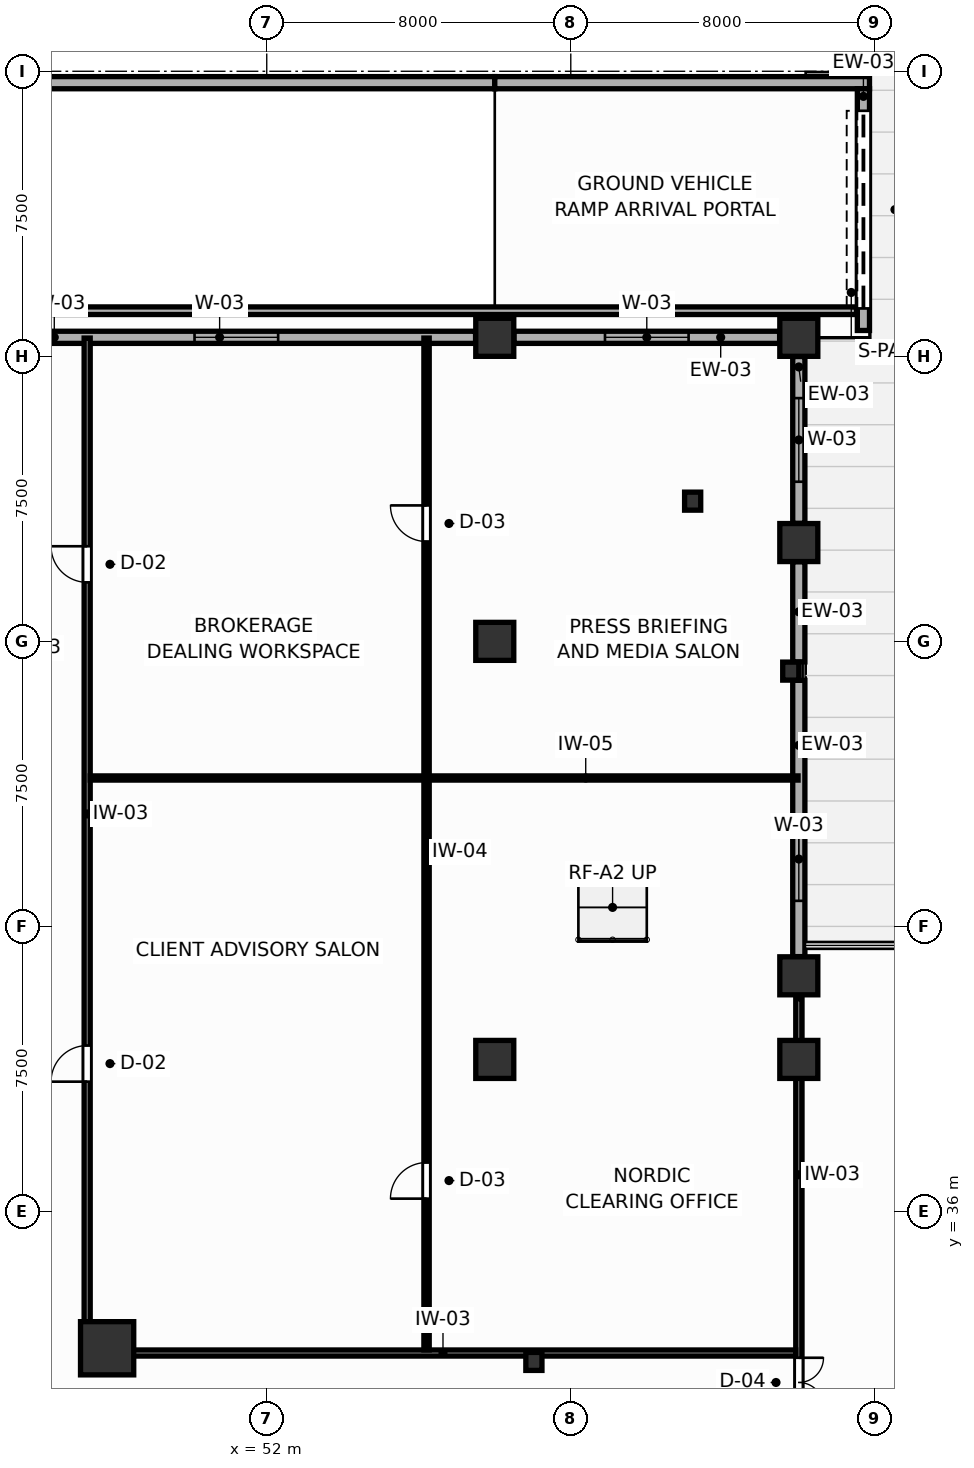
"""IFC4 building model, lengths in metres.
Left out: names, types, materials, properties, quantities, classifications, styles, units other than length and angle.
Written with IfcOpenShell. Run it as: python <this file> out.ifc"""

import sys

from ifc_helpers import new_model, si_unit, direction, frame, frame_2d, origin, origin_2d, place, context, subcontext, project, spatial, rectangle, i_section, extrude, source, transform, mapped, element, fill, save


model = new_model("IFC4")
c1 = context("Model", 3, precision=1e-05, world=origin(), true_north=direction((0.0, 1.0)))
c2 = subcontext(c1, "Body", "Model", "MODEL_VIEW")
j1 = project(units=[si_unit("LENGTHUNIT", "METRE"), si_unit("PLANEANGLEUNIT", "RADIAN")], contexts=[c1])
p1 = place(None, origin())
s1 = spatial("IfcSite", under=j1, at=p1, CompositionType="ELEMENT")
p2 = place(p1, origin())
s2 = spatial("IfcBuilding", under=s1, at=p2, CompositionType="ELEMENT")
p3 = place(p2, origin())
s3 = spatial("IfcBuildingStorey", under=s2, at=p3, CompositionType="ELEMENT", Elevation=0.0)
m1 = source(origin(), c2, "Body", "SweptSolid", [
    extrude(rectangle(XDim=1.4, YDim=1.4, at=origin_2d()), origin(), (0.0, 0.0, 1.0), 4.8),
])
p4 = place(p3, frame((47.8, 32.4, 0.0), z_axis=(0.0, 0.0, 1.0), x_axis=(1.0, 0.0, 0.0)))
e1 = element("IfcColumn", 1, at=p4, inside=s3, PredefinedType="COLUMN", context=c2, shape_type="MappedRepresentation", body=[
    mapped(m1, transform((0.0, 0.0, 0.0), scale=1.0)),
])
m2 = source(origin(), c2, "Body", "SweptSolid", [
    extrude(rectangle(XDim=1.0, YDim=1.0, at=origin_2d()), origin(), (0.0, 0.0, 1.0), 4.8),
])
for number, where, z_axis, x_axis in (
    (2, (66.0, 40.0, 0.0), (0.0, 0.0, 1.0), (1.0, 0.0, 0.0)),
    (3, (66.0, 53.6, 0.0), (0.0, 0.0, 1.0), (1.0, 0.0, 0.0)),
    (4, (66.0, 59.0, 0.0), (0.0, 0.0, 1.0), (1.0, 0.0, 0.0)),
    (5, (58.0, 59.0, 0.0), (0.0, 0.0, 1.0), (1.0, 0.0, 0.0)),
    (6, (58.0, 40.0, 0.0), (0.0, 0.0, 1.0), (1.0, 0.0, 0.0)),
    (7, (58.0, 51.0, 0.0), (0.0, 0.0, 1.0), (1.0, 0.0, 0.0)),
    (8, (66.0, 42.2, 0.0), (0.0, 0.0, 1.0), (1.0, 0.0, 0.0)),
):
    element("IfcColumn", number, at=place(p3, frame(where, z_axis=z_axis, x_axis=x_axis)), inside=s3, PredefinedType="COLUMN", context=c2, shape_type="MappedRepresentation", body=[
        mapped(m2, transform((0.0, 0.0, 0.0), scale=1.0)),
    ])
m3 = source(origin(), c2, "Body", "SweptSolid", [
    extrude(i_section(OverallWidth=0.424, OverallDepth=0.474, WebThickness=0.045, FlangeThickness=0.072, FilletRadius=0.015, at=origin_2d()), origin(), (0.0, 0.0, 1.0), 4.8),
])
for number, where, z_axis, x_axis in (
    (9, (65.789, 50.217, 0.0), (0.0, 0.0, 1.0), (1.0, 0.0, 0.0)),
    (10, (63.207, 54.689, 0.0), (0.0, 0.0, 1.0), (1.0, 0.0, 0.0)),
    (11, (59.03, 32.054, 0.0), (0.0, 0.0, 1.0), (1.0, 0.0, 0.0)),
):
    element("IfcColumn", number, at=place(p3, frame(where, z_axis=z_axis, x_axis=x_axis)), inside=s3, PredefinedType="COLUMN", context=c2, shape_type="MappedRepresentation", body=[
        mapped(m3, transform((0.0, 0.0, 0.0), scale=1.0)),
    ])
p5 = place(p3, frame((44.905, 59.0, 0.0), z_axis=(0.0, 0.0, 1.0), x_axis=(1.0, 0.0, 0.0)))
e12 = element("IfcWall", 12, at=p5, inside=s3, PredefinedType="SOLIDWALL", context=c2, shape_type="SweptSolid", body=[
    extrude(rectangle(XDim=12.59, YDim=0.32, at=frame_2d((6.295, 0.0))), origin(), (0.0, 0.0, 1.0), 3.82),
])
p6 = place(p5, frame((5.195, 0.0, 0.75)))
e13 = element("IfcOpeningElement", 13, at=p6, cuts=e12, PredefinedType="OPENING", context=c2, shape_type="SweptSolid", body=[
    extrude(rectangle(XDim=2.2, YDim=2.0, at=frame_2d((1.1, 1.0))), frame((0.0, 0.17, 0.0), z_axis=(0.0, -1.0, 0.0), x_axis=(1.0, 0.0, 0.0)), (0.0, 0.0, 1.0), 0.34),
])
p7 = place(p3, frame((58.505, 59.0, 0.0), z_axis=(0.0, 0.0, 1.0), x_axis=(1.0, 0.0, 0.0)))
e14 = element("IfcWall", 14, at=p7, inside=s3, PredefinedType="SOLIDWALL", context=c2, shape_type="SweptSolid", body=[
    extrude(rectangle(XDim=6.99, YDim=0.32, at=frame_2d((3.495, 0.0))), origin(), (0.0, 0.0, 1.0), 3.82),
])
p8 = place(p7, frame((2.395, 0.0, 0.75)))
e15 = element("IfcOpeningElement", 15, at=p8, cuts=e14, PredefinedType="OPENING", context=c2, shape_type="SweptSolid", body=[
    extrude(rectangle(XDim=2.2, YDim=2.0, at=frame_2d((1.1, 1.0))), frame((0.0, 0.17, 0.0), z_axis=(0.0, -1.0, 0.0), x_axis=(1.0, 0.0, 0.0)), (0.0, 0.0, 1.0), 0.34),
])
p9 = place(p3, frame((66.0, 42.705, 0.0), z_axis=(0.0, 0.0, 1.0), x_axis=(0.0, 1.0, 0.0)))
e16 = element("IfcWall", 16, at=p9, inside=s3, PredefinedType="SOLIDWALL", context=c2, shape_type="SweptSolid", body=[
    extrude(rectangle(XDim=7.27, YDim=0.32, at=frame_2d((3.635, 0.0))), origin(), (0.0, 0.0, 1.0), 3.82),
])
p10 = place(p9, frame((1.468, 0.0, 0.75)))
e17 = element("IfcOpeningElement", 17, at=p10, cuts=e16, PredefinedType="OPENING", context=c2, shape_type="SweptSolid", body=[
    extrude(rectangle(XDim=2.2, YDim=2.0, at=frame_2d((1.1, 1.0))), frame((0.0, 0.17, 0.0), z_axis=(0.0, -1.0, 0.0), x_axis=(1.0, 0.0, 0.0)), (0.0, 0.0, 1.0), 0.34),
])
p11 = place(p3, frame((66.0, 50.459, 0.0), z_axis=(0.0, 0.0, 1.0), x_axis=(0.0, 1.0, 0.0)))
e18 = element("IfcWall", 18, at=p11, inside=s3, PredefinedType="SOLIDWALL", context=c2, shape_type="SweptSolid", body=[
    extrude(rectangle(XDim=2.636, YDim=0.32, at=frame_2d((1.318, 0.0))), origin(), (0.0, 0.0, 1.0), 3.82),
])
p12 = place(p3, frame((66.0, 54.105, 0.0), z_axis=(0.0, 0.0, 1.0), x_axis=(0.0, 1.0, 0.0)))
e19 = element("IfcWall", 19, at=p12, inside=s3, PredefinedType="SOLIDWALL", context=c2, shape_type="SweptSolid", body=[
    extrude(rectangle(XDim=4.39, YDim=0.32, at=frame_2d((2.195, 0.0))), origin(), (0.0, 0.0, 1.0), 3.82),
])
p13 = place(p12, frame((1.095, 0.0, 0.75)))
e20 = element("IfcOpeningElement", 20, at=p13, cuts=e19, PredefinedType="OPENING", context=c2, shape_type="SweptSolid", body=[
    extrude(rectangle(XDim=2.2, YDim=2.0, at=frame_2d((1.1, 1.0))), frame((0.0, 0.17, 0.0), z_axis=(0.0, -1.0, 0.0), x_axis=(1.0, 0.0, 0.0)), (0.0, 0.0, 1.0), 0.34),
])
p14 = place(p3, frame((46.0, 65.7, 0.0), z_axis=(0.0, 0.0, 1.0), x_axis=(1.0, 0.0, 0.0)))
e21 = element("IfcWall", 21, at=p14, inside=s3, PredefinedType="SOLIDWALL", context=c2, shape_type="SweptSolid", body=[
    extrude(rectangle(XDim=12.0, YDim=0.32, at=frame_2d((6.0, 0.0))), origin(), (0.0, 0.0, 1.0), 4.52),
])
p15 = place(p3, frame((58.0, 65.7, 0.0), z_axis=(0.0, 0.0, 1.0), x_axis=(1.0, 0.0, 0.0)))
e22 = element("IfcWall", 22, at=p15, inside=s3, PredefinedType="SOLIDWALL", context=c2, shape_type="SweptSolid", body=[
    extrude(rectangle(XDim=9.86, YDim=0.32, at=frame_2d((4.93, 0.0))), origin(), (0.0, 0.0, 1.0), 4.52),
])
p16 = place(p3, frame((67.7, 59.18, 0.0), z_axis=(0.0, 0.0, 1.0), x_axis=(0.0, 1.0, 0.0)))
e23 = element("IfcWall", 23, at=p16, inside=s3, PredefinedType="SOLIDWALL", context=c2, shape_type="SweptSolid", body=[
    extrude(rectangle(XDim=6.36, YDim=0.32, at=frame_2d((3.18, 0.0))), origin(), (0.0, 0.0, 1.0), 4.52),
])
p17 = place(p16, frame((0.58, 0.0, 0.0)))
e24 = element("IfcOpeningElement", 24, at=p17, cuts=e23, PredefinedType="OPENING", context=c2, shape_type="SweptSolid", body=[
    extrude(rectangle(XDim=5.2, YDim=2.6, at=frame_2d((2.6, 1.3))), frame((0.0, 0.17, 0.0), z_axis=(0.0, -1.0, 0.0), x_axis=(1.0, 0.0, 0.0)), (0.0, 0.0, 1.0), 0.34),
])
p18 = place(p3, frame((66.0, 30.4, 0.0), z_axis=(0.0, 0.0, 1.0), x_axis=(0.0, 1.0, 0.0)))
e25 = element("IfcWall", 25, at=p18, inside=s3, PredefinedType="PARTITIONING", context=c2, shape_type="SweptSolid", body=[
    extrude(rectangle(XDim=11.2, YDim=0.16, at=frame_2d((5.6, 0.0))), origin(), (0.0, 0.0, 1.0), 3.82),
])
p19 = place(p18, frame((0.45, 0.0, 0.0)))
e26 = element("IfcOpeningElement", 26, at=p19, cuts=e25, PredefinedType="OPENING", context=c2, shape_type="SweptSolid", body=[
    extrude(rectangle(XDim=1.3, YDim=2.1, at=frame_2d((0.65, 1.05))), frame((0.0, 0.09, 0.0), z_axis=(0.0, -1.0, 0.0), x_axis=(1.0, 0.0, 0.0)), (0.0, 0.0, 1.0), 0.18),
])
p20 = place(p3, frame((22.02, 59.7, 0.0), z_axis=(0.0, 0.0, 1.0), x_axis=(1.0, 0.0, 0.0)))
e27 = element("IfcWall", 27, at=p20, inside=s3, PredefinedType="PARTITIONING", context=c2, shape_type="SweptSolid", body=[
    extrude(rectangle(XDim=45.5, YDim=0.2, at=frame_2d((22.75, 0.0))), origin(), (0.0, 0.0, 1.0), 4.52),
])
p21 = place(p3, frame((47.275, 32.27, 0.0), z_axis=(0.0, 0.0, 1.0), x_axis=(0.0, 1.0, 0.0)))
e28 = element("IfcWall", 28, at=p21, inside=s3, PredefinedType="PARTITIONING", context=c2, shape_type="SweptSolid", body=[
    extrude(rectangle(XDim=26.71, YDim=0.16, at=frame_2d((13.355, 0.0))), origin(), (0.0, 0.0, 1.0), 4.52),
])
p22 = place(p21, frame((7.145, 0.0, 0.0)))
e29 = element("IfcOpeningElement", 29, at=p22, cuts=e28, PredefinedType="OPENING", context=c2, shape_type="SweptSolid", body=[
    extrude(rectangle(XDim=0.95, YDim=2.05, at=frame_2d((0.475, 1.025))), frame((0.0, 0.09, 0.0), z_axis=(0.0, -1.0, 0.0), x_axis=(1.0, 0.0, 0.0)), (0.0, 0.0, 1.0), 0.18),
])
p23 = place(p21, frame((20.283, 0.0, 0.0)))
e30 = element("IfcOpeningElement", 30, at=p23, cuts=e28, PredefinedType="OPENING", context=c2, shape_type="SweptSolid", body=[
    extrude(rectangle(XDim=0.95, YDim=2.05, at=frame_2d((0.475, 1.025))), frame((0.0, 0.09, 0.0), z_axis=(0.0, -1.0, 0.0), x_axis=(1.0, 0.0, 0.0)), (0.0, 0.0, 1.0), 0.18),
])
p24 = place(p3, frame((47.357, 32.275, 0.0), z_axis=(0.0, 0.0, 1.0), x_axis=(1.0, 0.0, 0.0)))
e31 = element("IfcWall", 31, at=p24, inside=s3, PredefinedType="PARTITIONING", context=c2, shape_type="SweptSolid", body=[
    extrude(rectangle(XDim=18.561, YDim=0.16, at=frame_2d((9.281, 0.0))), origin(), (0.0, 0.0, 1.0), 3.82),
])
p25 = place(p3, frame((56.205, 32.357, 0.0), z_axis=(0.0, 0.0, 1.0), x_axis=(0.0, 1.0, 0.0)))
e32 = element("IfcWall", 32, at=p25, inside=s3, PredefinedType="PARTITIONING", context=c2, shape_type="SweptSolid", body=[
    extrude(rectangle(XDim=26.623, YDim=0.14, at=frame_2d((13.312, 0.0))), origin(), (0.0, 0.0, 1.0), 4.52),
])
p26 = place(p25, frame((3.98, 0.0, 0.0)))
e33 = element("IfcOpeningElement", 33, at=p26, cuts=e32, PredefinedType="OPENING", context=c2, shape_type="SweptSolid", body=[
    extrude(rectangle(XDim=0.95, YDim=2.05, at=frame_2d((0.475, 1.025))), frame((0.0, 0.08, 0.0), z_axis=(0.0, -1.0, 0.0), x_axis=(1.0, 0.0, 0.0)), (0.0, 0.0, 1.0), 0.16),
])
p27 = place(p25, frame((21.27, 0.0, 0.0)))
e34 = element("IfcOpeningElement", 34, at=p27, cuts=e32, PredefinedType="OPENING", context=c2, shape_type="SweptSolid", body=[
    extrude(rectangle(XDim=0.95, YDim=2.05, at=frame_2d((0.475, 1.025))), frame((0.0, 0.08, 0.0), z_axis=(0.0, -1.0, 0.0), x_axis=(1.0, 0.0, 0.0)), (0.0, 0.0, 1.0), 0.16),
])
p28 = place(p3, frame((47.357, 47.405, 0.0), z_axis=(0.0, 0.0, 1.0), x_axis=(1.0, 0.0, 0.0)))
e35 = element("IfcWall", 35, at=p28, inside=s3, PredefinedType="MOVABLE", context=c2, shape_type="SweptSolid", body=[
    extrude(rectangle(XDim=18.623, YDim=0.11, at=frame_2d((9.312, 0.0))), origin(), (0.0, 0.0, 1.0), 4.52),
])
p29 = place(p6, origin())
e36 = element("IfcWindow", 36, at=p29, inside=s3, PartitioningType="SINGLE_PANEL", PredefinedType="WINDOW", context=c2, shape_type="SweptSolid", body=[
    extrude(rectangle(XDim=2.2, YDim=2.0, at=frame_2d((1.1, 1.0))), frame((0.0, 0.03, 0.0), z_axis=(0.0, -1.0, 0.0), x_axis=(1.0, 0.0, 0.0)), (0.0, 0.0, 1.0), 0.06),
])
fill(e13, e36)
p30 = place(p8, origin())
e37 = element("IfcWindow", 37, at=p30, inside=s3, PartitioningType="SINGLE_PANEL", PredefinedType="WINDOW", context=c2, shape_type="SweptSolid", body=[
    extrude(rectangle(XDim=2.2, YDim=2.0, at=frame_2d((1.1, 1.0))), frame((0.0, 0.03, 0.0), z_axis=(0.0, -1.0, 0.0), x_axis=(1.0, 0.0, 0.0)), (0.0, 0.0, 1.0), 0.06),
])
fill(e15, e37)
p31 = place(p10, origin())
e38 = element("IfcWindow", 38, at=p31, inside=s3, PartitioningType="SINGLE_PANEL", PredefinedType="WINDOW", context=c2, shape_type="SweptSolid", body=[
    extrude(rectangle(XDim=2.2, YDim=2.0, at=frame_2d((1.1, 1.0))), frame((0.0, 0.03, 0.0), z_axis=(0.0, -1.0, 0.0), x_axis=(1.0, 0.0, 0.0)), (0.0, 0.0, 1.0), 0.06),
])
fill(e17, e38)
p32 = place(p13, origin())
e39 = element("IfcWindow", 39, at=p32, inside=s3, PartitioningType="SINGLE_PANEL", PredefinedType="WINDOW", context=c2, shape_type="SweptSolid", body=[
    extrude(rectangle(XDim=2.2, YDim=2.0, at=frame_2d((1.1, 1.0))), frame((0.0, 0.03, 0.0), z_axis=(0.0, -1.0, 0.0), x_axis=(1.0, 0.0, 0.0)), (0.0, 0.0, 1.0), 0.06),
])
fill(e20, e39)
p33 = place(p17, origin())
e40 = element("IfcDoor", 40, at=p33, inside=s3, OperationType="ROLLINGUP", PredefinedType="DOOR", context=c2, shape_type="SweptSolid", body=[
    extrude(rectangle(XDim=5.2, YDim=2.6, at=frame_2d((2.6, 1.3))), frame((0.0, 0.025, 0.0), z_axis=(0.0, -1.0, 0.0), x_axis=(1.0, 0.0, 0.0)), (0.0, 0.0, 1.0), 0.05),
])
fill(e24, e40)
p34 = place(p19, frame((1.3, 0.0, 0.0), z_axis=(0.0, 0.0, 1.0), x_axis=(-1.0, 0.0, 0.0)))
e41 = element("IfcDoor", 41, at=p34, inside=s3, OperationType="DOUBLE_DOOR_SINGLE_SWING", PredefinedType="DOOR", context=c2, shape_type="SweptSolid", body=[
    extrude(rectangle(XDim=1.3, YDim=2.1, at=frame_2d((0.65, 1.05))), frame((0.0, 0.025, 0.0), z_axis=(0.0, -1.0, 0.0), x_axis=(1.0, 0.0, 0.0)), (0.0, 0.0, 1.0), 0.05),
])
fill(e26, e41)
p35 = place(p22, origin())
e42 = element("IfcDoor", 42, at=p35, inside=s3, OperationType="SINGLE_SWING_LEFT", PredefinedType="DOOR", context=c2, shape_type="SweptSolid", body=[
    extrude(rectangle(XDim=0.95, YDim=2.05, at=frame_2d((0.475, 1.025))), frame((0.0, 0.025, 0.0), z_axis=(0.0, -1.0, 0.0), x_axis=(1.0, 0.0, 0.0)), (0.0, 0.0, 1.0), 0.05),
])
fill(e29, e42)
p36 = place(p23, origin())
e43 = element("IfcDoor", 43, at=p36, inside=s3, OperationType="SINGLE_SWING_RIGHT", PredefinedType="DOOR", context=c2, shape_type="SweptSolid", body=[
    extrude(rectangle(XDim=0.95, YDim=2.05, at=frame_2d((0.475, 1.025))), frame((0.0, 0.025, 0.0), z_axis=(0.0, -1.0, 0.0), x_axis=(1.0, 0.0, 0.0)), (0.0, 0.0, 1.0), 0.05),
])
fill(e30, e43)
p37 = place(p26, origin())
e44 = element("IfcDoor", 44, at=p37, inside=s3, OperationType="SINGLE_SWING_LEFT", PredefinedType="DOOR", context=c2, shape_type="SweptSolid", body=[
    extrude(rectangle(XDim=0.95, YDim=2.05, at=frame_2d((0.475, 1.025))), frame((0.0, 0.025, 0.0), z_axis=(0.0, -1.0, 0.0), x_axis=(1.0, 0.0, 0.0)), (0.0, 0.0, 1.0), 0.05),
])
fill(e33, e44)
p38 = place(p27, origin())
e45 = element("IfcDoor", 45, at=p38, inside=s3, OperationType="SINGLE_SWING_RIGHT", PredefinedType="DOOR", context=c2, shape_type="SweptSolid", body=[
    extrude(rectangle(XDim=0.95, YDim=2.05, at=frame_2d((0.475, 1.025))), frame((0.0, 0.025, 0.0), z_axis=(0.0, -1.0, 0.0), x_axis=(1.0, 0.0, 0.0)), (0.0, 0.0, 1.0), 0.05),
])
fill(e34, e45)
save(model, sys.argv[1])
